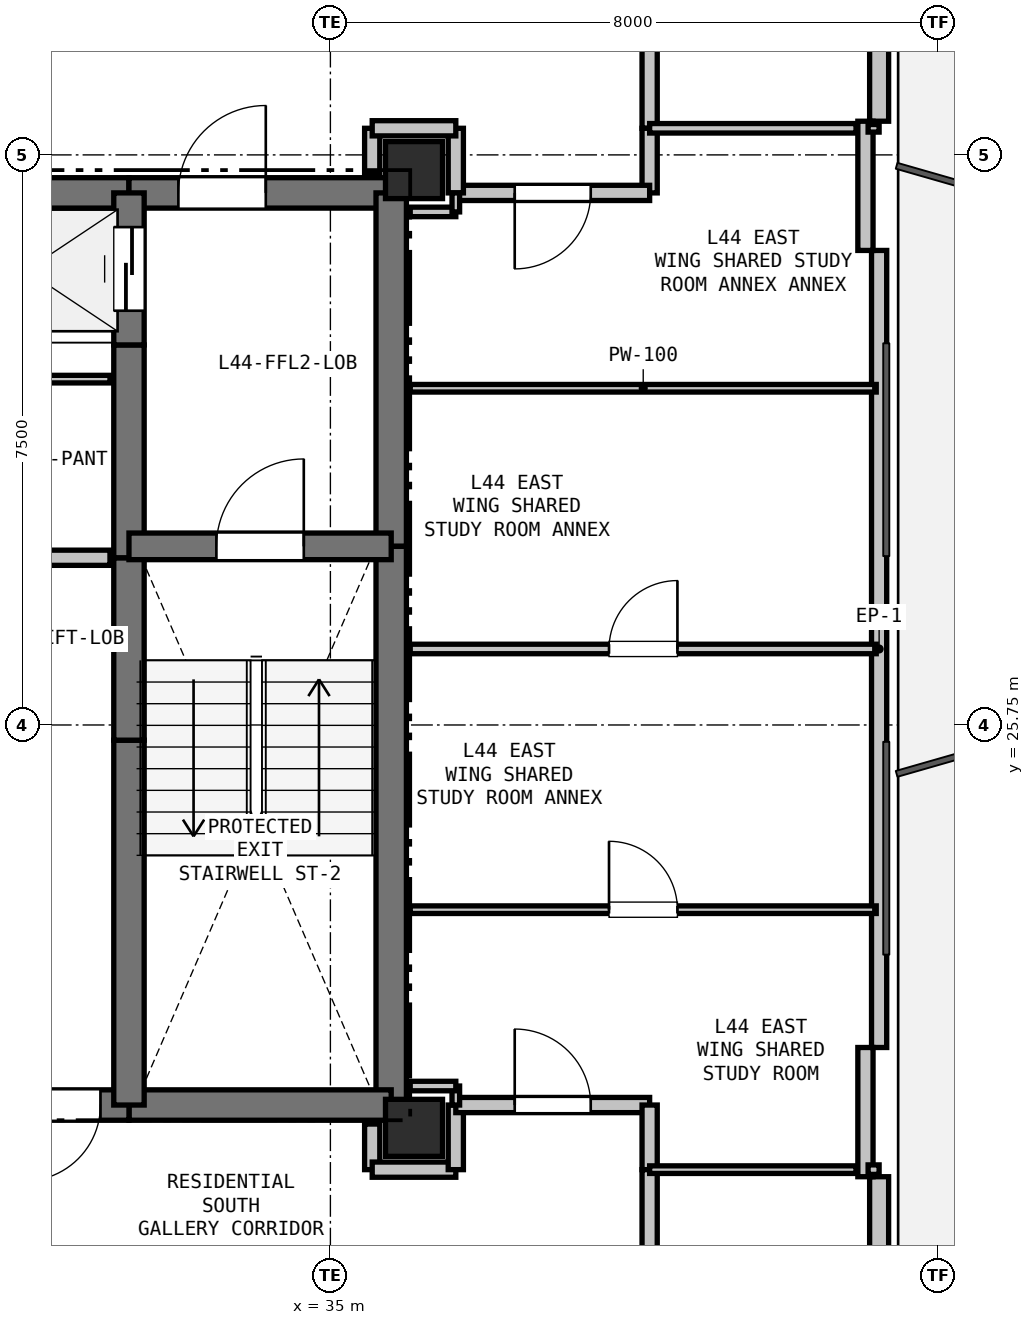
"""IFC4 building model, lengths in metres.
Left out: names, types, materials, properties, quantities, classifications, styles, units other than length and angle.
Written with IfcOpenShell. Run it as: python <this file> out.ifc"""

import sys

from ifc_helpers import new_model, si_unit, direction, frame, frame_2d, origin, origin_2d, place, context, subcontext, project, spatial, rectangle, extrude, element, fill, save


model = new_model("IFC4")
c1 = context("Model", 3, precision=1e-05, world=origin(), true_north=direction((0.0, 1.0)))
c2 = subcontext(c1, "Body", "Model", "MODEL_VIEW")
j1 = project(units=[si_unit("LENGTHUNIT", "METRE"), si_unit("PLANEANGLEUNIT", "RADIAN")], contexts=[c1])
p1 = place(None, origin())
s1 = spatial("IfcSite", under=j1, at=p1, CompositionType="ELEMENT")
p2 = place(p1, origin())
s2 = spatial("IfcBuilding", under=s1, at=p2, CompositionType="ELEMENT")
p3 = place(p2, frame((0.0, 0.0, 157.5)))
s3 = spatial("IfcBuildingStorey", under=s2, at=p3, CompositionType="ELEMENT", Elevation=157.5)
for number, where, z_axis, x_axis in (
    (1, (36.1, 33.05, 0.0), (0.0, 0.0, 1.0), (1.0, 0.0, 0.0)),
    (2, (36.1, 20.45, 0.0), (0.0, 0.0, 1.0), (1.0, 0.0, 0.0)),
):
    element("IfcColumn", number, at=place(p3, frame(where, z_axis=z_axis, x_axis=x_axis)), inside=s3, PredefinedType="COLUMN", context=c2, shape_type="SweptSolid", body=[
        extrude(rectangle(XDim=0.75, YDim=0.75, at=origin_2d()), origin(), (0.0, 0.0, 1.0), 3.3),
    ])
p4 = place(p3, frame((42.219, 44.879, 0.0), z_axis=(0.0, 0.0, 1.0), x_axis=(0.0, -1.0, 0.0)))
e3 = element("IfcWall", 3, at=p4, inside=s3, PredefinedType="SOLIDWALL", context=c2, shape_type="SweptSolid", body=[
    extrude(rectangle(XDim=11.186, YDim=0.25, at=frame_2d((5.593, 0.0))), origin(), (0.0, 0.0, 1.0), 2.6),
])
p5 = place(p4, frame((7.095, 0.0, 0.0)))
e4 = element("IfcOpeningElement", 4, at=p5, cuts=e3, PredefinedType="OPENING", context=c2, shape_type="SweptSolid", body=[
    extrude(rectangle(XDim=1.1, YDim=2.1, at=frame_2d((0.55, 1.05))), frame((0.0, 0.135, 0.0), z_axis=(0.0, -1.0, 0.0), x_axis=(1.0, 0.0, 0.0)), (0.0, 0.0, 1.0), 0.27),
])
p6 = place(p3, frame((42.219, 31.993, 0.0), z_axis=(0.0, 0.0, 1.0), x_axis=(0.0, -1.0, 0.0)))
e5 = element("IfcWall", 5, at=p6, inside=s3, PredefinedType="PARAPET", context=c2, shape_type="SweptSolid", body=[
    extrude(rectangle(XDim=10.486, YDim=0.2, at=frame_2d((5.243, 0.0))), origin(), (0.0, 0.0, 1.0), 0.2),
])
p7 = place(p3, frame((42.219, 19.807, 0.0), z_axis=(0.0, 0.0, 1.0), x_axis=(0.0, -1.0, 0.0)))
e6 = element("IfcWall", 6, at=p7, inside=s3, PredefinedType="SOLIDWALL", context=c2, shape_type="SweptSolid", body=[
    extrude(rectangle(XDim=11.186, YDim=0.25, at=frame_2d((5.593, 0.0))), origin(), (0.0, 0.0, 1.0), 2.6),
])
p8 = place(p7, frame((2.796, 0.0, 0.9)))
e7 = element("IfcOpeningElement", 7, at=p8, cuts=e6, PredefinedType="OPENING", context=c2, shape_type="SweptSolid", body=[
    extrude(rectangle(XDim=1.2, YDim=1.5, at=frame_2d((0.6, 0.75))), frame((0.0, 0.135, 0.0), z_axis=(0.0, -1.0, 0.0), x_axis=(1.0, 0.0, 0.0)), (0.0, 0.0, 1.0), 0.27),
])
for number, where, z_axis, x_axis in (
    (8, (42.039, 33.693, 0.0), (0.0, 0.0, 1.0), (0.0, -1.0, 0.0)),
    (9, (42.039, 21.507, 0.0), (0.0, 0.0, 1.0), (0.0, -1.0, 0.0)),
):
    element("IfcWall", number, at=place(p3, frame(where, z_axis=z_axis, x_axis=x_axis)), inside=s3, PredefinedType="PARAPET", context=c2, shape_type="SweptSolid", body=[
        extrude(rectangle(XDim=1.7, YDim=0.2, at=frame_2d((0.85, 0.0))), origin(), (0.0, 0.0, 1.0), 2.6),
    ])
p9 = place(p3, frame((29.65, 32.75, 0.0), z_axis=(0.0, 0.0, 1.0), x_axis=(1.0, 0.0, 0.0)))
e10 = element("IfcWall", 10, at=p9, inside=s3, PredefinedType="SHEAR", context=c2, shape_type="SweptSolid", body=[
    extrude(rectangle(XDim=2.7, YDim=0.4, at=frame_2d((1.35, 0.0))), origin(), (0.0, 0.0, 1.0), 2.98),
])
p10 = place(p3, frame((32.35, 32.75, 0.0), z_axis=(0.0, 0.0, 1.0), x_axis=(1.0, 0.0, 0.0)))
e11 = element("IfcWall", 11, at=p10, inside=s3, PredefinedType="SHEAR", context=c2, shape_type="SweptSolid", body=[
    extrude(rectangle(XDim=3.45, YDim=0.4, at=frame_2d((1.725, 0.0))), origin(), (0.0, 0.0, 1.0), 2.98),
])
p11 = place(p10, frame((0.65, 0.0, 0.0)))
e12 = element("IfcOpeningElement", 12, at=p11, cuts=e11, PredefinedType="OPENING", context=c2, shape_type="SweptSolid", body=[
    extrude(rectangle(XDim=1.15, YDim=2.15, at=frame_2d((0.575, 1.075))), frame((0.0, 0.21, 0.0), z_axis=(0.0, -1.0, 0.0), x_axis=(1.0, 0.0, 0.0)), (0.0, 0.0, 1.0), 0.42),
])
p12 = place(p3, frame((35.8, 32.75, 0.0), z_axis=(0.0, 0.0, 1.0), x_axis=(0.0, -1.0, 0.0)))
e13 = element("IfcWall", 13, at=p12, inside=s3, PredefinedType="SHEAR", context=c2, shape_type="SweptSolid", body=[
    extrude(rectangle(XDim=4.65, YDim=0.4, at=frame_2d((2.325, 0.0))), origin(), (0.0, 0.0, 1.0), 2.98),
])
p13 = place(p3, frame((35.8, 28.1, 0.0), z_axis=(0.0, 0.0, 1.0), x_axis=(0.0, -1.0, 0.0)))
e14 = element("IfcWall", 14, at=p13, inside=s3, PredefinedType="SHEAR", context=c2, shape_type="SweptSolid", body=[
    extrude(rectangle(XDim=7.35, YDim=0.4, at=frame_2d((3.675, 0.0))), origin(), (0.0, 0.0, 1.0), 2.98),
])
p14 = place(p3, frame((35.8, 20.75, 0.0), z_axis=(0.0, 0.0, 1.0), x_axis=(-1.0, 0.0, 0.0)))
e15 = element("IfcWall", 15, at=p14, inside=s3, PredefinedType="SHEAR", context=c2, shape_type="SweptSolid", body=[
    extrude(rectangle(XDim=3.45, YDim=0.4, at=frame_2d((1.725, 0.0))), origin(), (0.0, 0.0, 1.0), 2.98),
])
p15 = place(p3, frame((32.35, 20.75, 0.0), z_axis=(0.0, 0.0, 1.0), x_axis=(-1.0, 0.0, 0.0)))
e16 = element("IfcWall", 16, at=p15, inside=s3, PredefinedType="SHEAR", context=c2, shape_type="SweptSolid", body=[
    extrude(rectangle(XDim=1.75, YDim=0.4, at=frame_2d((0.875, 0.0))), origin(), (0.0, 0.0, 1.0), 2.98),
])
p16 = place(p15, frame((0.375, 0.0, 0.0)))
e17 = element("IfcOpeningElement", 17, at=p16, cuts=e16, PredefinedType="OPENING", context=c2, shape_type="SweptSolid", body=[
    extrude(rectangle(XDim=1.0, YDim=2.15, at=frame_2d((0.5, 1.075))), frame((0.0, 0.21, 0.0), z_axis=(0.0, -1.0, 0.0), x_axis=(1.0, 0.0, 0.0)), (0.0, 0.0, 1.0), 0.42),
])
p17 = place(p3, frame((32.35, 20.75, 0.0), z_axis=(0.0, 0.0, 1.0), x_axis=(0.0, 1.0, 0.0)))
e18 = element("IfcWall", 18, at=p17, inside=s3, PredefinedType="SHEAR", context=c2, shape_type="SweptSolid", body=[
    extrude(rectangle(XDim=4.8, YDim=0.4, at=frame_2d((2.4, 0.0))), origin(), (0.0, 0.0, 1.0), 2.98),
])
p18 = place(p3, frame((32.35, 25.55, 0.0), z_axis=(0.0, 0.0, 1.0), x_axis=(0.0, 1.0, 0.0)))
e19 = element("IfcWall", 19, at=p18, inside=s3, PredefinedType="SHEAR", context=c2, shape_type="SweptSolid", body=[
    extrude(rectangle(XDim=2.4, YDim=0.4, at=frame_2d((1.2, 0.0))), origin(), (0.0, 0.0, 1.0), 2.98),
])
p19 = place(p3, frame((32.35, 27.95, 0.0), z_axis=(0.0, 0.0, 1.0), x_axis=(0.0, 1.0, 0.0)))
e20 = element("IfcWall", 20, at=p19, inside=s3, PredefinedType="SHEAR", context=c2, shape_type="SweptSolid", body=[
    extrude(rectangle(XDim=2.8, YDim=0.4, at=frame_2d((1.4, 0.0))), origin(), (0.0, 0.0, 1.0), 2.98),
])
p20 = place(p3, frame((32.35, 30.75, 0.0), z_axis=(0.0, 0.0, 1.0), x_axis=(0.0, 1.0, 0.0)))
e21 = element("IfcWall", 21, at=p20, inside=s3, PredefinedType="SHEAR", context=c2, shape_type="SweptSolid", body=[
    extrude(rectangle(XDim=2.0, YDim=0.4, at=frame_2d((1.0, 0.0))), origin(), (0.0, 0.0, 1.0), 2.98),
])
p21 = place(p20, frame((0.45, 0.0, 0.0)))
e22 = element("IfcOpeningElement", 22, at=p21, cuts=e21, PredefinedType="OPENING", context=c2, shape_type="SweptSolid", body=[
    extrude(rectangle(XDim=1.1, YDim=2.15, at=frame_2d((0.55, 1.075))), frame((0.0, 0.21, 0.0), z_axis=(0.0, -1.0, 0.0), x_axis=(1.0, 0.0, 0.0)), (0.0, 0.0, 1.0), 0.42),
])
p22 = place(p3, frame((32.35, 28.1, 0.0), z_axis=(0.0, 0.0, 1.0), x_axis=(1.0, 0.0, 0.0)))
e23 = element("IfcWall", 23, at=p22, inside=s3, PredefinedType="SHEAR", context=c2, shape_type="SweptSolid", body=[
    extrude(rectangle(XDim=3.45, YDim=0.35, at=frame_2d((1.725, 0.0))), origin(), (0.0, 0.0, 1.0), 2.98),
])
p23 = place(p22, frame((1.15, 0.0, 0.0)))
e24 = element("IfcOpeningElement", 24, at=p23, cuts=e23, PredefinedType="OPENING", context=c2, shape_type="SweptSolid", body=[
    extrude(rectangle(XDim=1.15, YDim=2.15, at=frame_2d((0.575, 1.075))), frame((0.0, 0.185, 0.0), z_axis=(0.0, -1.0, 0.0), x_axis=(1.0, 0.0, 0.0)), (0.0, 0.0, 1.0), 0.37),
])
p24 = place(p3, frame((32.1, 30.3, 0.0), z_axis=(0.0, 0.0, 1.0), x_axis=(-1.0, 0.0, 0.0)))
e25 = element("IfcWall", 25, at=p24, inside=s3, PredefinedType="PARTITIONING", context=c2, shape_type="SweptSolid", body=[
    extrude(rectangle(XDim=2.45, YDim=0.1, at=frame_2d((1.225, 0.0))), origin(), (0.0, 0.0, 1.0), 2.98),
])
p25 = place(p3, frame((27.4, 27.95, 0.0), z_axis=(0.0, 0.0, 1.0), x_axis=(1.0, 0.0, 0.0)))
e26 = element("IfcWall", 26, at=p25, inside=s3, PredefinedType="PARTITIONING", context=c2, shape_type="SweptSolid", body=[
    extrude(rectangle(XDim=4.7, YDim=0.2, at=frame_2d((2.35, 0.0))), origin(), (0.0, 0.0, 1.0), 2.98),
])
p26 = place(p25, frame((1.85, 0.0, 0.0)))
e27 = element("IfcOpeningElement", 27, at=p26, cuts=e26, PredefinedType="OPENING", context=c2, shape_type="SweptSolid", body=[
    extrude(rectangle(XDim=1.0, YDim=2.15, at=frame_2d((0.5, 1.075))), frame((0.0, 0.11, 0.0), z_axis=(0.0, -1.0, 0.0), x_axis=(1.0, 0.0, 0.0)), (0.0, 0.0, 1.0), 0.22),
])
p27 = place(p3, frame((35.55, 33.6, 0.0), z_axis=(0.0, 0.0, 1.0), x_axis=(0.0, -1.0, 0.0)))
e28 = element("IfcWall", 28, at=p27, inside=s3, PredefinedType="PARTITIONING", context=c2, shape_type="SweptSolid", body=[
    extrude(rectangle(XDim=0.6, YDim=0.2, at=frame_2d((0.3, 0.0))), origin(), (0.0, 0.0, 1.0), 2.505),
])
p28 = place(p3, frame((39.2, 35.35, 0.0), z_axis=(0.0, 0.0, 1.0), x_axis=(0.0, -1.0, 0.0)))
e29 = element("IfcWall", 29, at=p28, inside=s3, PredefinedType="PARTITIONING", context=c2, shape_type="SweptSolid", body=[
    extrude(rectangle(XDim=1.75, YDim=0.2, at=frame_2d((0.875, 0.0))), origin(), (0.0, 0.0, 1.0), 2.98),
])
p29 = place(p3, frame((39.2, 33.6, 0.0), z_axis=(0.0, 0.0, 1.0), x_axis=(0.0, -1.0, 0.0)))
e30 = element("IfcWall", 30, at=p29, inside=s3, PredefinedType="PARTITIONING", context=c2, shape_type="SweptSolid", body=[
    extrude(rectangle(XDim=0.85, YDim=0.2, at=frame_2d((0.425, 0.0))), origin(), (0.0, 0.0, 1.0), 2.98),
])
p30 = place(p3, frame((39.2, 32.75, 0.0), z_axis=(0.0, 0.0, 1.0), x_axis=(-1.0, 0.0, 0.0)))
e31 = element("IfcWall", 31, at=p30, inside=s3, PredefinedType="PARTITIONING", context=c2, shape_type="SweptSolid", body=[
    extrude(rectangle(XDim=2.55, YDim=0.2, at=frame_2d((1.275, 0.0))), origin(), (0.0, 0.0, 1.0), 2.98),
])
p31 = place(p30, frame((0.775, 0.0, 0.0)))
e32 = element("IfcOpeningElement", 32, at=p31, cuts=e31, PredefinedType="OPENING", context=c2, shape_type="SweptSolid", body=[
    extrude(rectangle(XDim=1.0, YDim=2.15, at=frame_2d((0.5, 1.075))), frame((0.0, 0.11, 0.0), z_axis=(0.0, -1.0, 0.0), x_axis=(1.0, 0.0, 0.0)), (0.0, 0.0, 1.0), 0.22),
])
p32 = place(p3, frame((36.65, 32.75, 0.0), z_axis=(0.0, 0.0, 1.0), x_axis=(0.0, 1.0, 0.0)))
e33 = element("IfcWall", 33, at=p32, inside=s3, PredefinedType="PARTITIONING", context=c2, shape_type="SweptSolid", body=[
    extrude(rectangle(XDim=0.85, YDim=0.2, at=frame_2d((0.425, 0.0))), origin(), (0.0, 0.0, 1.0), 2.428),
])
p33 = place(p3, frame((36.65, 33.6, 0.0), z_axis=(0.0, 0.0, 1.0), x_axis=(-1.0, 0.0, 0.0)))
e34 = element("IfcWall", 34, at=p33, inside=s3, PredefinedType="PARTITIONING", context=c2, shape_type="SweptSolid", body=[
    extrude(rectangle(XDim=1.1, YDim=0.2, at=frame_2d((0.55, 0.0))), origin(), (0.0, 0.0, 1.0), 2.428),
])
p34 = place(p3, frame((35.55, 20.5, 0.0), z_axis=(0.0, 0.0, 1.0), x_axis=(0.0, -1.0, 0.0)))
e35 = element("IfcWall", 35, at=p34, inside=s3, PredefinedType="PARTITIONING", context=c2, shape_type="SweptSolid", body=[
    extrude(rectangle(XDim=0.6, YDim=0.2, at=frame_2d((0.3, 0.0))), origin(), (0.0, 0.0, 1.0), 2.505),
])
p35 = place(p3, frame((35.55, 19.9, 0.0), z_axis=(0.0, 0.0, 1.0), x_axis=(1.0, 0.0, 0.0)))
e36 = element("IfcWall", 36, at=p35, inside=s3, PredefinedType="PARTITIONING", context=c2, shape_type="SweptSolid", body=[
    extrude(rectangle(XDim=1.1, YDim=0.2, at=frame_2d((0.55, 0.0))), origin(), (0.0, 0.0, 1.0), 2.428),
])
p36 = place(p3, frame((36.65, 19.9, 0.0), z_axis=(0.0, 0.0, 1.0), x_axis=(0.0, 1.0, 0.0)))
e37 = element("IfcWall", 37, at=p36, inside=s3, PredefinedType="PARTITIONING", context=c2, shape_type="SweptSolid", body=[
    extrude(rectangle(XDim=0.85, YDim=0.2, at=frame_2d((0.425, 0.0))), origin(), (0.0, 0.0, 1.0), 2.98),
])
p37 = place(p3, frame((36.65, 20.75, 0.0), z_axis=(0.0, 0.0, 1.0), x_axis=(1.0, 0.0, 0.0)))
e38 = element("IfcWall", 38, at=p37, inside=s3, PredefinedType="PARTITIONING", context=c2, shape_type="SweptSolid", body=[
    extrude(rectangle(XDim=2.55, YDim=0.2, at=frame_2d((1.275, 0.0))), origin(), (0.0, 0.0, 1.0), 2.98),
])
p38 = place(p37, frame((0.775, 0.0, 0.0)))
e39 = element("IfcOpeningElement", 39, at=p38, cuts=e38, PredefinedType="OPENING", context=c2, shape_type="SweptSolid", body=[
    extrude(rectangle(XDim=1.0, YDim=2.15, at=frame_2d((0.5, 1.075))), frame((0.0, 0.11, 0.0), z_axis=(0.0, -1.0, 0.0), x_axis=(1.0, 0.0, 0.0)), (0.0, 0.0, 1.0), 0.22),
])
p39 = place(p3, frame((39.2, 20.75, 0.0), z_axis=(0.0, 0.0, 1.0), x_axis=(0.0, -1.0, 0.0)))
e40 = element("IfcWall", 40, at=p39, inside=s3, PredefinedType="PARTITIONING", context=c2, shape_type="SweptSolid", body=[
    extrude(rectangle(XDim=0.85, YDim=0.2, at=frame_2d((0.425, 0.0))), origin(), (0.0, 0.0, 1.0), 2.98),
])
p40 = place(p3, frame((39.2, 19.9, 0.0), z_axis=(0.0, 0.0, 1.0), x_axis=(0.0, -1.0, 0.0)))
e41 = element("IfcWall", 41, at=p40, inside=s3, PredefinedType="PARTITIONING", context=c2, shape_type="SweptSolid", body=[
    extrude(rectangle(XDim=1.75, YDim=0.2, at=frame_2d((0.875, 0.0))), origin(), (0.0, 0.0, 1.0), 2.98),
])
p41 = place(p3, frame((36.65, 20.75, 0.0), z_axis=(0.0, 0.0, 1.0), x_axis=(0.0, 1.0, 0.0)))
e42 = element("IfcWall", 42, at=p41, inside=s3, PredefinedType="PARTITIONING", context=c2, shape_type="SweptSolid", body=[
    extrude(rectangle(XDim=0.25, YDim=0.1, at=frame_2d((0.125, 0.0))), origin(), (0.0, 0.0, 1.0), 2.98),
])
p42 = place(p3, frame((36.65, 21.0, 0.0), z_axis=(0.0, 0.0, 1.0), x_axis=(-1.0, 0.0, 0.0)))
e43 = element("IfcWall", 43, at=p42, inside=s3, PredefinedType="PARTITIONING", context=c2, shape_type="SweptSolid", body=[
    extrude(rectangle(XDim=0.6, YDim=0.125, at=frame_2d((0.3, 0.0))), origin(), (0.0, 0.0, 1.0), 2.505),
])
p43 = place(p3, frame((36.05, 23.32, 0.0), z_axis=(0.0, 0.0, 1.0), x_axis=(1.0, 0.0, 0.0)))
e44 = element("IfcWall", 44, at=p43, inside=s3, PredefinedType="PARTITIONING", context=c2, shape_type="SweptSolid", body=[
    extrude(rectangle(XDim=6.131, YDim=0.1, at=frame_2d((3.065, 0.0))), origin(), (0.0, 0.0, 1.0), 2.365),
])
p44 = place(p43, frame((2.615, 0.0, 0.0)))
e45 = element("IfcOpeningElement", 45, at=p44, cuts=e44, PredefinedType="OPENING", context=c2, shape_type="SweptSolid", body=[
    extrude(rectangle(XDim=0.9, YDim=2.1, at=frame_2d((0.45, 1.05))), frame((0.0, 0.06, 0.0), z_axis=(0.0, -1.0, 0.0), x_axis=(1.0, 0.0, 0.0)), (0.0, 0.0, 1.0), 0.12),
])
p45 = place(p3, frame((42.219, 19.9, 0.0), z_axis=(0.0, 0.0, 1.0), x_axis=(-1.0, 0.0, 0.0)))
e46 = element("IfcWall", 46, at=p45, inside=s3, PredefinedType="PARTITIONING", context=c2, shape_type="SweptSolid", body=[
    extrude(rectangle(XDim=0.145, YDim=0.125, at=frame_2d((0.072, 0.0))), origin(), (0.0, 0.0, 1.0), 2.98),
])
p46 = place(p3, frame((41.915, 19.9, 0.0), z_axis=(0.0, 0.0, 1.0), x_axis=(-1.0, 0.0, 0.0)))
e47 = element("IfcWall", 47, at=p46, inside=s3, PredefinedType="PARTITIONING", context=c2, shape_type="SweptSolid", body=[
    extrude(rectangle(XDim=2.715, YDim=0.1, at=frame_2d((1.358, 0.0))), origin(), (0.0, 0.0, 1.0), 2.365),
])
p47 = place(p3, frame((36.05, 26.75, 0.0), z_axis=(0.0, 0.0, 1.0), x_axis=(1.0, 0.0, 0.0)))
e48 = element("IfcWall", 48, at=p47, inside=s3, PredefinedType="PARTITIONING", context=c2, shape_type="SweptSolid", body=[
    extrude(rectangle(XDim=6.131, YDim=0.125, at=frame_2d((3.065, 0.0))), origin(), (0.0, 0.0, 1.0), 2.365),
])
p48 = place(p47, frame((2.615, 0.0, 0.0)))
e49 = element("IfcOpeningElement", 49, at=p48, cuts=e48, PredefinedType="OPENING", context=c2, shape_type="SweptSolid", body=[
    extrude(rectangle(XDim=0.9, YDim=2.1, at=frame_2d((0.45, 1.05))), frame((0.0, 0.073, 0.0), z_axis=(0.0, -1.0, 0.0), x_axis=(1.0, 0.0, 0.0)), (0.0, 0.0, 1.0), 0.145),
])
p49 = place(p3, frame((36.05, 30.18, 0.0), z_axis=(0.0, 0.0, 1.0), x_axis=(1.0, 0.0, 0.0)))
e50 = element("IfcWall", 50, at=p49, inside=s3, PredefinedType="PARTITIONING", context=c2, shape_type="SweptSolid", body=[
    extrude(rectangle(XDim=6.131, YDim=0.1, at=frame_2d((3.065, 0.0))), origin(), (0.0, 0.0, 1.0), 2.365),
])
p50 = place(p3, frame((39.2, 33.6, 0.0), z_axis=(0.0, 0.0, 1.0), x_axis=(1.0, 0.0, 0.0)))
e51 = element("IfcWall", 51, at=p50, inside=s3, PredefinedType="PARTITIONING", context=c2, shape_type="SweptSolid", body=[
    extrude(rectangle(XDim=2.715, YDim=0.125, at=frame_2d((1.358, 0.0))), origin(), (0.0, 0.0, 1.0), 2.365),
])
p51 = place(p3, frame((42.074, 33.6, 0.0), z_axis=(0.0, 0.0, 1.0), x_axis=(1.0, 0.0, 0.0)))
e52 = element("IfcWall", 52, at=p51, inside=s3, PredefinedType="PARTITIONING", context=c2, shape_type="SweptSolid", body=[
    extrude(rectangle(XDim=0.145, YDim=0.1, at=frame_2d((0.072, 0.0))), origin(), (0.0, 0.0, 1.0), 2.98),
])
p52 = place(p3, frame((36.05, 32.5, 0.0), z_axis=(0.0, 0.0, 1.0), x_axis=(1.0, 0.0, 0.0)))
e53 = element("IfcWall", 53, at=p52, inside=s3, PredefinedType="PARTITIONING", context=c2, shape_type="SweptSolid", body=[
    extrude(rectangle(XDim=0.6, YDim=0.125, at=frame_2d((0.3, 0.0))), origin(), (0.0, 0.0, 1.0), 2.505),
])
p53 = place(p3, frame((36.65, 32.5, 0.0), z_axis=(0.0, 0.0, 1.0), x_axis=(0.0, 1.0, 0.0)))
e54 = element("IfcWall", 54, at=p53, inside=s3, PredefinedType="PARTITIONING", context=c2, shape_type="SweptSolid", body=[
    extrude(rectangle(XDim=0.25, YDim=0.1, at=frame_2d((0.125, 0.0))), origin(), (0.0, 0.0, 1.0), 2.98),
])
p54 = place(p16, origin())
e55 = element("IfcDoor", 55, at=p54, inside=s3, OperationType="SINGLE_SWING_RIGHT", PredefinedType="DOOR", context=c2, shape_type="SweptSolid", body=[
    extrude(rectangle(XDim=1.0, YDim=2.15, at=frame_2d((0.5, 1.075))), frame((0.0, 0.025, 0.0), z_axis=(0.0, -1.0, 0.0), x_axis=(1.0, 0.0, 0.0)), (0.0, 0.0, 1.0), 0.05),
])
fill(e17, e55)
p55 = place(p21, origin())
e56 = element("IfcDoor", 56, at=p55, inside=s3, OperationType="SLIDING_TO_LEFT", PredefinedType="DOOR", context=c2, shape_type="SweptSolid", body=[
    extrude(rectangle(XDim=1.1, YDim=2.15, at=frame_2d((0.55, 1.075))), frame((0.0, 0.025, 0.0), z_axis=(0.0, -1.0, 0.0), x_axis=(1.0, 0.0, 0.0)), (0.0, 0.0, 1.0), 0.05),
])
fill(e22, e56)
p56 = place(p23, origin())
e57 = element("IfcDoor", 57, at=p56, inside=s3, OperationType="SINGLE_SWING_RIGHT", PredefinedType="DOOR", context=c2, shape_type="SweptSolid", body=[
    extrude(rectangle(XDim=1.15, YDim=2.15, at=frame_2d((0.575, 1.075))), frame((0.0, 0.025, 0.0), z_axis=(0.0, -1.0, 0.0), x_axis=(1.0, 0.0, 0.0)), (0.0, 0.0, 1.0), 0.05),
])
fill(e24, e57)
p57 = place(p11, origin())
e58 = element("IfcDoor", 58, at=p57, inside=s3, OperationType="SINGLE_SWING_RIGHT", PredefinedType="DOOR", context=c2, shape_type="SweptSolid", body=[
    extrude(rectangle(XDim=1.15, YDim=2.15, at=frame_2d((0.575, 1.075))), frame((0.0, 0.025, 0.0), z_axis=(0.0, -1.0, 0.0), x_axis=(1.0, 0.0, 0.0)), (0.0, 0.0, 1.0), 0.05),
])
fill(e12, e58)
p58 = place(p31, origin())
e59 = element("IfcDoor", 59, at=p58, inside=s3, OperationType="SINGLE_SWING_RIGHT", PredefinedType="DOOR", context=c2, shape_type="SweptSolid", body=[
    extrude(rectangle(XDim=1.0, YDim=2.15, at=frame_2d((0.5, 1.075))), frame((0.0, 0.025, 0.0), z_axis=(0.0, -1.0, 0.0), x_axis=(1.0, 0.0, 0.0)), (0.0, 0.0, 1.0), 0.05),
])
fill(e32, e59)
p59 = place(p38, origin())
e60 = element("IfcDoor", 60, at=p59, inside=s3, OperationType="SINGLE_SWING_LEFT", PredefinedType="DOOR", context=c2, shape_type="SweptSolid", body=[
    extrude(rectangle(XDim=1.0, YDim=2.15, at=frame_2d((0.5, 1.075))), frame((0.0, 0.025, 0.0), z_axis=(0.0, -1.0, 0.0), x_axis=(1.0, 0.0, 0.0)), (0.0, 0.0, 1.0), 0.05),
])
fill(e39, e60)
p60 = place(p44, origin())
e61 = element("IfcDoor", 61, at=p60, inside=s3, OperationType="SINGLE_SWING_LEFT", PredefinedType="DOOR", context=c2, shape_type="SweptSolid", body=[
    extrude(rectangle(XDim=0.9, YDim=2.1, at=frame_2d((0.45, 1.05))), frame((0.0, 0.025, 0.0), z_axis=(0.0, -1.0, 0.0), x_axis=(1.0, 0.0, 0.0)), (0.0, 0.0, 1.0), 0.05),
])
fill(e45, e61)
p61 = place(p48, origin())
e62 = element("IfcDoor", 62, at=p61, inside=s3, OperationType="SINGLE_SWING_RIGHT", PredefinedType="DOOR", context=c2, shape_type="SweptSolid", body=[
    extrude(rectangle(XDim=0.9, YDim=2.1, at=frame_2d((0.45, 1.05))), frame((0.0, 0.025, 0.0), z_axis=(0.0, -1.0, 0.0), x_axis=(1.0, 0.0, 0.0)), (0.0, 0.0, 1.0), 0.05),
])
fill(e49, e62)
save(model, sys.argv[1])
